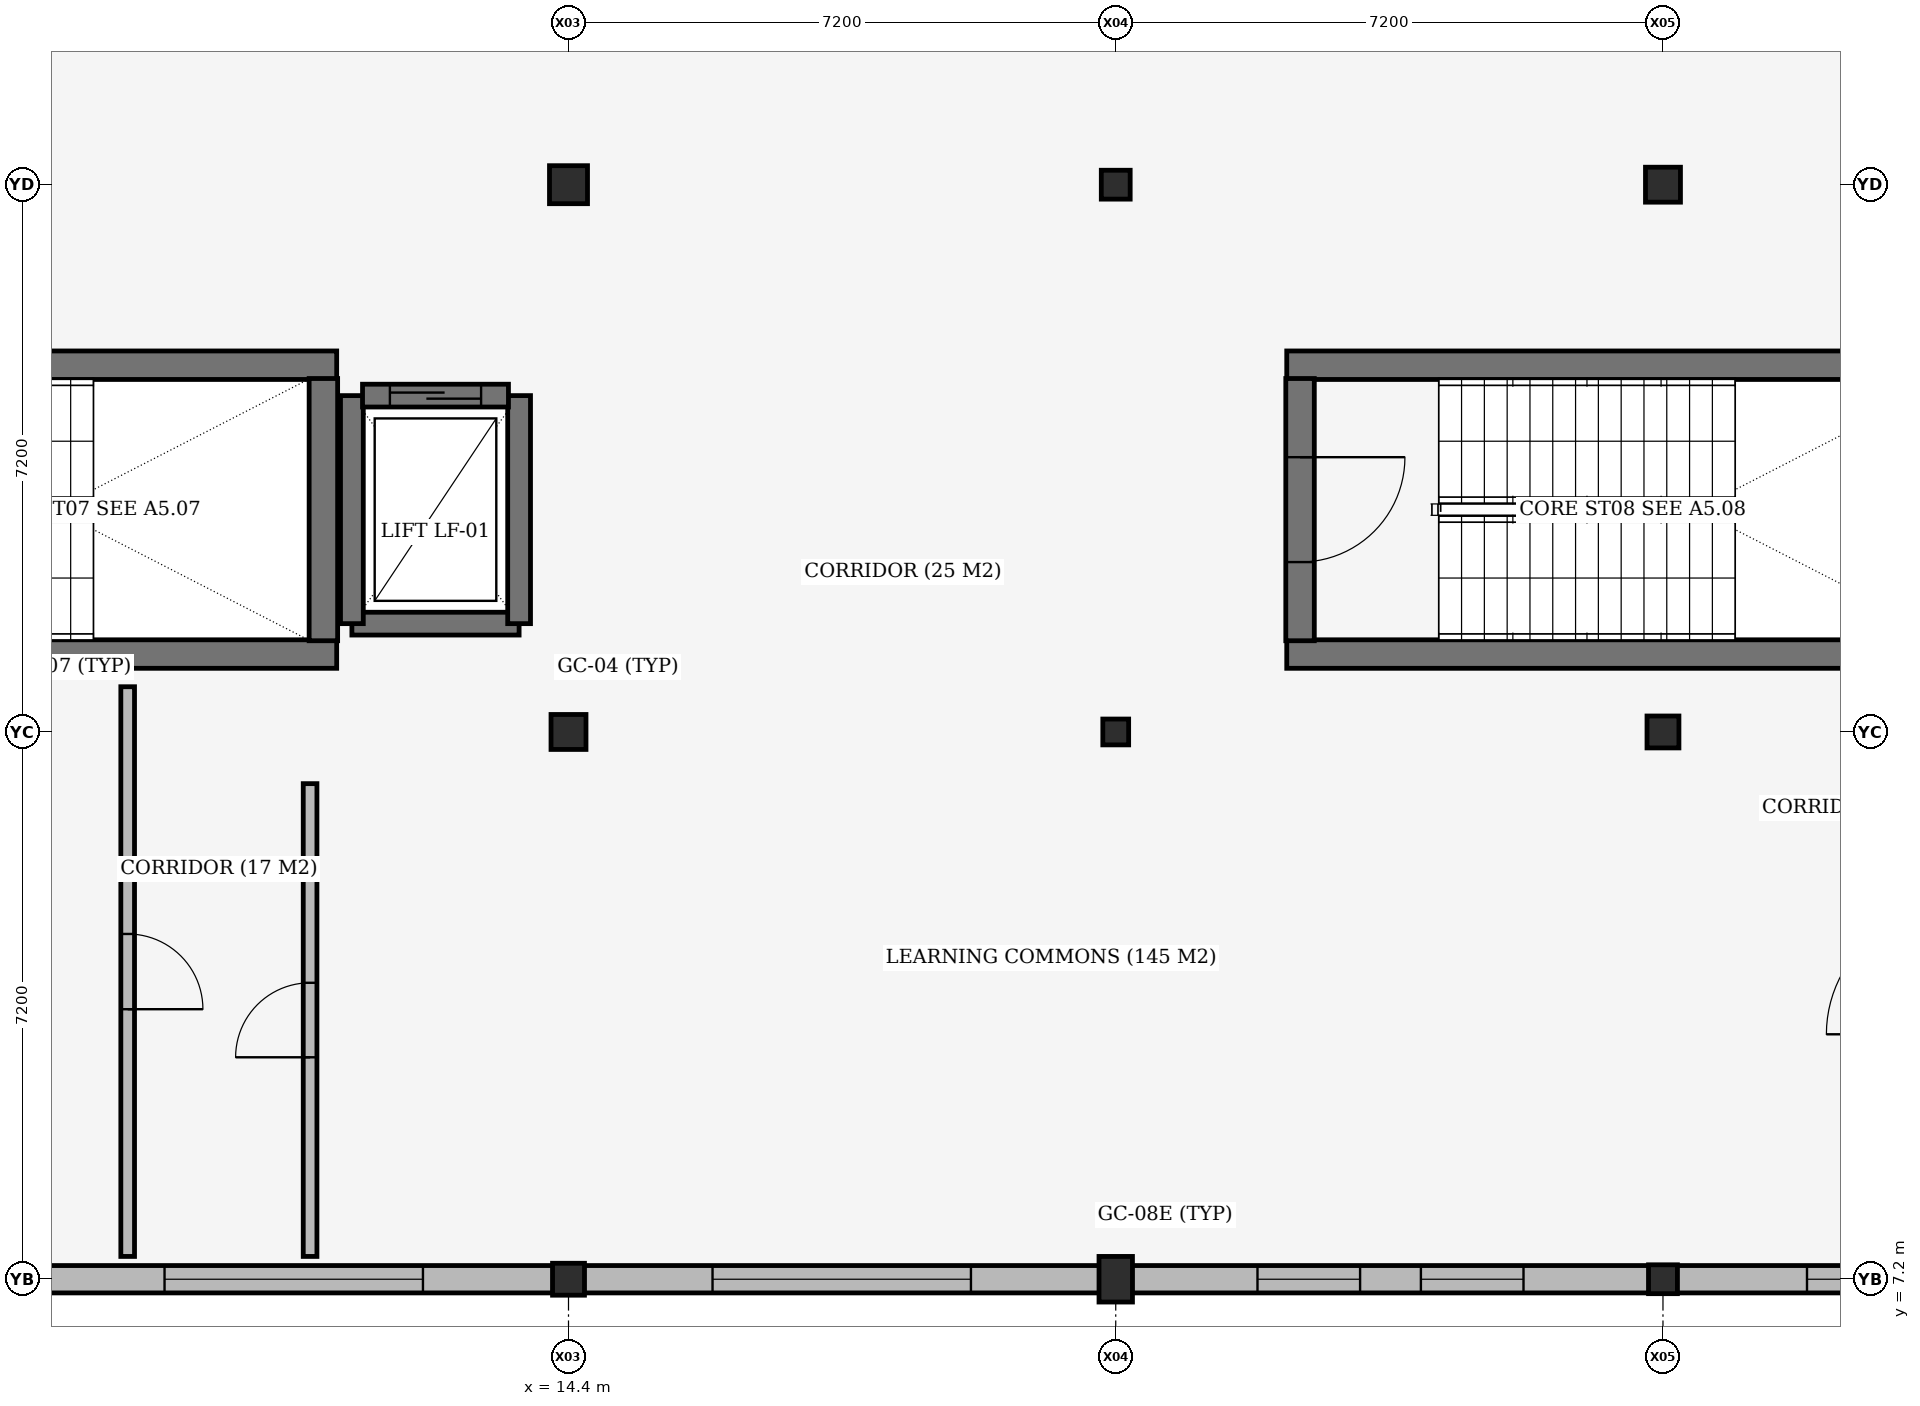
"""IFC4 building model, lengths in metres.
Left out: names, types, materials, properties, quantities, classifications, styles, units other than length and angle.
Written with IfcOpenShell. Run it as: python <this file> out.ifc"""

import sys

from ifc_helpers import new_model, si_unit, direction, frame, frame_2d, origin, origin_2d, place, context, subcontext, project, spatial, rectangle, extrude, element, fill, save


model = new_model("IFC4")
c1 = context("Model", 3, precision=1e-05, world=origin(), true_north=direction((0.0, 1.0)))
c2 = subcontext(c1, "Body", "Model", "MODEL_VIEW")
j1 = project(units=[si_unit("LENGTHUNIT", "METRE"), si_unit("PLANEANGLEUNIT", "RADIAN")], contexts=[c1])
p1 = place(None, origin())
s1 = spatial("IfcSite", under=j1, at=p1, CompositionType="ELEMENT")
p2 = place(p1, origin())
s2 = spatial("IfcBuilding", under=s1, at=p2, CompositionType="ELEMENT")
p3 = place(p2, frame((0.0, 0.0, 13.8)))
s3 = spatial("IfcBuildingStorey", under=s2, at=p3, CompositionType="ELEMENT", Elevation=13.8)
p4 = place(p3, frame((14.4, 7.2, 0.0), z_axis=(0.0, 0.0, 1.0), x_axis=(1.0, 0.0, 0.0)))
e1 = element("IfcColumn", 1, at=p4, inside=s3, PredefinedType="COLUMN", context=c2, shape_type="SweptSolid", body=[
    extrude(rectangle(XDim=0.42, YDim=0.42, at=origin_2d()), origin(), (0.0, 0.0, 1.0), 3.92),
])
p5 = place(p3, frame((14.4, 14.4, 0.0), z_axis=(0.0, 0.0, 1.0), x_axis=(1.0, 0.0, 0.0)))
e2 = element("IfcColumn", 2, at=p5, inside=s3, PredefinedType="COLUMN", context=c2, shape_type="SweptSolid", body=[
    extrude(rectangle(XDim=0.46, YDim=0.46, at=origin_2d()), origin(), (0.0, 0.0, 1.0), 3.92),
])
p6 = place(p3, frame((14.4, 21.6, 0.0), z_axis=(0.0, 0.0, 1.0), x_axis=(1.0, 0.0, 0.0)))
e3 = element("IfcColumn", 3, at=p6, inside=s3, PredefinedType="COLUMN", context=c2, shape_type="SweptSolid", body=[
    extrude(rectangle(XDim=0.5, YDim=0.5, at=origin_2d()), origin(), (0.0, 0.0, 1.0), 3.92),
])
p7 = place(p3, frame((21.6, 7.2, 0.0), z_axis=(0.0, 0.0, 1.0), x_axis=(1.0, 0.0, 0.0)))
e4 = element("IfcColumn", 4, at=p7, inside=s3, PredefinedType="COLUMN", context=c2, shape_type="SweptSolid", body=[
    extrude(rectangle(XDim=0.44, YDim=0.6, at=origin_2d()), origin(), (0.0, 0.0, 1.0), 3.92),
])
p8 = place(p3, frame((21.6, 14.4, 0.0), z_axis=(0.0, 0.0, 1.0), x_axis=(1.0, 0.0, 0.0)))
e5 = element("IfcColumn", 5, at=p8, inside=s3, PredefinedType="COLUMN", context=c2, shape_type="SweptSolid", body=[
    extrude(rectangle(XDim=0.34, YDim=0.34, at=origin_2d()), origin(), (0.0, 0.0, 1.0), 3.92),
])
for number, where, z_axis, x_axis in (
    (6, (21.6, 21.6, 0.0), (0.0, 0.0, 1.0), (1.0, 0.0, 0.0)),
    (7, (28.8, 7.2, 0.0), (0.0, 0.0, 1.0), (1.0, 0.0, 0.0)),
):
    element("IfcColumn", number, at=place(p3, frame(where, z_axis=z_axis, x_axis=x_axis)), inside=s3, PredefinedType="COLUMN", context=c2, shape_type="SweptSolid", body=[
        extrude(rectangle(XDim=0.38, YDim=0.38, at=origin_2d()), origin(), (0.0, 0.0, 1.0), 3.92),
    ])
p9 = place(p3, frame((28.8, 14.4, 0.0), z_axis=(0.0, 0.0, 1.0), x_axis=(1.0, 0.0, 0.0)))
e8 = element("IfcColumn", 8, at=p9, inside=s3, PredefinedType="COLUMN", context=c2, shape_type="SweptSolid", body=[
    extrude(rectangle(XDim=0.42, YDim=0.42, at=origin_2d()), origin(), (0.0, 0.0, 1.0), 3.92),
])
p10 = place(p3, frame((28.8, 21.6, 0.0), z_axis=(0.0, 0.0, 1.0), x_axis=(1.0, 0.0, 0.0)))
e9 = element("IfcColumn", 9, at=p10, inside=s3, PredefinedType="COLUMN", context=c2, shape_type="SweptSolid", body=[
    extrude(rectangle(XDim=0.46, YDim=0.46, at=origin_2d()), origin(), (0.0, 0.0, 1.0), 3.92),
])
for number, where, z_axis, x_axis in (
    (10, (2.25, 15.425, 0.0), (0.0, 0.0, 1.0), (1.0, 0.0, 0.0)),
    (11, (11.35, 19.225, 0.0), (0.0, 0.0, 1.0), (-1.0, 0.0, 0.0)),
):
    element("IfcWall", number, at=place(p3, frame(where, z_axis=z_axis, x_axis=x_axis)), inside=s3, PredefinedType="SHEAR", context=c2, shape_type="SweptSolid", body=[
        extrude(rectangle(XDim=9.1, YDim=0.375, at=frame_2d((4.55, 0.0))), origin(), (0.0, 0.0, 1.0), 3.92),
    ])
p11 = place(p3, frame((11.175, 15.6, 0.0), z_axis=(0.0, 0.0, 1.0), x_axis=(0.0, 1.0, 0.0)))
e12 = element("IfcWall", 12, at=p11, inside=s3, PredefinedType="SHEAR", context=c2, shape_type="SweptSolid", body=[
    extrude(rectangle(XDim=3.45, YDim=0.375, at=frame_2d((1.725, 0.0))), origin(), (0.0, 0.0, 1.0), 3.92),
])
for number, where, z_axis, x_axis in (
    (13, (23.85, 15.425, 0.0), (0.0, 0.0, 1.0), (1.0, 0.0, 0.0)),
    (14, (32.95, 19.225, 0.0), (0.0, 0.0, 1.0), (-1.0, 0.0, 0.0)),
):
    element("IfcWall", number, at=place(p3, frame(where, z_axis=z_axis, x_axis=x_axis)), inside=s3, PredefinedType="SHEAR", context=c2, shape_type="SweptSolid", body=[
        extrude(rectangle(XDim=9.1, YDim=0.375, at=frame_2d((4.55, 0.0))), origin(), (0.0, 0.0, 1.0), 3.92),
    ])
p12 = place(p3, frame((11.55, 15.825, 0.0), z_axis=(0.0, 0.0, 1.0), x_axis=(1.0, 0.0, 0.0)))
e15 = element("IfcWall", 15, at=p12, inside=s3, PredefinedType="SHEAR", context=c2, shape_type="SweptSolid", body=[
    extrude(rectangle(XDim=2.2, YDim=0.3, at=frame_2d((1.1, 0.0))), origin(), (0.0, 0.0, 1.0), 3.92),
])
for number, where, z_axis, x_axis in (
    (16, (11.55, 18.825, 0.0), (0.0, 0.0, 1.0), (0.0, -1.0, 0.0)),
    (17, (13.75, 15.825, 0.0), (0.0, 0.0, 1.0), (0.0, 1.0, 0.0)),
):
    element("IfcWall", number, at=place(p3, frame(where, z_axis=z_axis, x_axis=x_axis)), inside=s3, PredefinedType="SHEAR", context=c2, shape_type="SweptSolid", body=[
        extrude(rectangle(XDim=3.0, YDim=0.3, at=frame_2d((1.5, 0.0))), origin(), (0.0, 0.0, 1.0), 3.92),
    ])
p13 = place(p3, frame((14.198, 7.2, 0.0), z_axis=(0.0, 0.0, 1.0), x_axis=(-1.0, 0.0, 0.0)))
e18 = element("IfcWall", 18, at=p13, inside=s3, PredefinedType="STANDARD", context=c2, shape_type="SweptSolid", body=[
    extrude(rectangle(XDim=6.826, YDim=0.36, at=frame_2d((3.413, 0.0))), origin(), (0.0, 0.0, 1.0), 3.18),
])
p14 = place(p13, frame((1.713, 0.0, 0.9)))
e19 = element("IfcOpeningElement", 19, at=p14, cuts=e18, PredefinedType="OPENING", context=c2, shape_type="SweptSolid", body=[
    extrude(rectangle(XDim=3.4, YDim=1.5, at=frame_2d((1.7, 0.75))), frame((0.0, 0.19, 0.0), z_axis=(0.0, -1.0, 0.0), x_axis=(1.0, 0.0, 0.0)), (0.0, 0.0, 1.0), 0.38),
])
p15 = place(p3, frame((21.388, 7.2, 0.0), z_axis=(0.0, 0.0, 1.0), x_axis=(-1.0, 0.0, 0.0)))
e20 = element("IfcWall", 20, at=p15, inside=s3, PredefinedType="STANDARD", context=c2, shape_type="SweptSolid", body=[
    extrude(rectangle(XDim=6.786, YDim=0.36, at=frame_2d((3.393, 0.0))), origin(), (0.0, 0.0, 1.0), 3.24),
])
p16 = place(p15, frame((1.693, 0.0, 0.9)))
e21 = element("IfcOpeningElement", 21, at=p16, cuts=e20, PredefinedType="OPENING", context=c2, shape_type="SweptSolid", body=[
    extrude(rectangle(XDim=3.4, YDim=1.5, at=frame_2d((1.7, 0.75))), frame((0.0, 0.19, 0.0), z_axis=(0.0, -1.0, 0.0), x_axis=(1.0, 0.0, 0.0)), (0.0, 0.0, 1.0), 0.38),
])
p17 = place(p3, frame((28.618, 7.2, 0.0), z_axis=(0.0, 0.0, 1.0), x_axis=(-1.0, 0.0, 0.0)))
e22 = element("IfcWall", 22, at=p17, inside=s3, PredefinedType="STANDARD", context=c2, shape_type="SweptSolid", body=[
    extrude(rectangle(XDim=6.806, YDim=0.36, at=frame_2d((3.403, 0.0))), origin(), (0.0, 0.0, 1.0), 3.18),
])
p18 = place(p17, frame((1.653, 0.0, 0.95)))
e23 = element("IfcOpeningElement", 23, at=p18, cuts=e22, PredefinedType="OPENING", context=c2, shape_type="SweptSolid", body=[
    extrude(rectangle(XDim=1.35, YDim=2.0, at=frame_2d((0.675, 1.0))), frame((0.0, 0.19, 0.0), z_axis=(0.0, -1.0, 0.0), x_axis=(1.0, 0.0, 0.0)), (0.0, 0.0, 1.0), 0.38),
])
p19 = place(p17, frame((3.803, 0.0, 0.95)))
e24 = element("IfcOpeningElement", 24, at=p19, cuts=e22, PredefinedType="OPENING", context=c2, shape_type="SweptSolid", body=[
    extrude(rectangle(XDim=1.35, YDim=2.0, at=frame_2d((0.675, 1.0))), frame((0.0, 0.19, 0.0), z_axis=(0.0, -1.0, 0.0), x_axis=(1.0, 0.0, 0.0)), (0.0, 0.0, 1.0), 0.38),
])
p20 = place(p3, frame((35.808, 7.2, 0.0), z_axis=(0.0, 0.0, 1.0), x_axis=(-1.0, 0.0, 0.0)))
e25 = element("IfcWall", 25, at=p20, inside=s3, PredefinedType="STANDARD", context=c2, shape_type="SweptSolid", body=[
    extrude(rectangle(XDim=6.826, YDim=0.36, at=frame_2d((3.413, 0.0))), origin(), (0.0, 0.0, 1.0), 3.4),
])
p21 = place(p20, frame((1.713, 0.0, 0.9)))
e26 = element("IfcOpeningElement", 26, at=p21, cuts=e25, PredefinedType="OPENING", context=c2, shape_type="SweptSolid", body=[
    extrude(rectangle(XDim=3.4, YDim=1.5, at=frame_2d((1.7, 0.75))), frame((0.0, 0.19, 0.0), z_axis=(0.0, -1.0, 0.0), x_axis=(1.0, 0.0, 0.0)), (0.0, 0.0, 1.0), 0.38),
])
p22 = place(p3, frame((24.025, 19.05, 0.0), z_axis=(0.0, 0.0, 1.0), x_axis=(0.0, -1.0, 0.0)))
e27 = element("IfcWall", 27, at=p22, inside=s3, PredefinedType="SHEAR", context=c2, shape_type="SweptSolid", body=[
    extrude(rectangle(XDim=3.45, YDim=0.375, at=frame_2d((1.725, 0.0))), origin(), (0.0, 0.0, 1.0), 3.92),
])
p23 = place(p22, frame((1.035, 0.0, 0.0)))
e28 = element("IfcOpeningElement", 28, at=p23, cuts=e27, PredefinedType="OPENING", context=c2, shape_type="SweptSolid", body=[
    extrude(rectangle(XDim=1.38, YDim=2.2, at=frame_2d((0.69, 1.1))), frame((0.0, 0.198, 0.0), z_axis=(0.0, -1.0, 0.0), x_axis=(1.0, 0.0, 0.0)), (0.0, 0.0, 1.0), 0.395),
])
p24 = place(p3, frame((11.69, 18.825, 0.0), z_axis=(0.0, 0.0, 1.0), x_axis=(1.0, 0.0, 0.0)))
e29 = element("IfcWall", 29, at=p24, inside=s3, PredefinedType="SHEAR", context=c2, shape_type="SweptSolid", body=[
    extrude(rectangle(XDim=1.92, YDim=0.3, at=frame_2d((0.96, 0.0))), origin(), (0.0, 0.0, 1.0), 3.92),
])
p25 = place(p24, frame((0.36, 0.0, 0.0)))
e30 = element("IfcOpeningElement", 30, at=p25, cuts=e29, PredefinedType="OPENING", context=c2, shape_type="SweptSolid", body=[
    extrude(rectangle(XDim=1.2, YDim=2.1, at=frame_2d((0.6, 1.05))), frame((0.0, 0.16, 0.0), z_axis=(0.0, -1.0, 0.0), x_axis=(1.0, 0.0, 0.0)), (0.0, 0.0, 1.0), 0.32),
])
p26 = place(p3, frame((8.6, 7.5, 0.0), z_axis=(0.0, 0.0, 1.0), x_axis=(0.0, 1.0, 0.0)))
e31 = element("IfcWall", 31, at=p26, inside=s3, PredefinedType="PARTITIONING", context=c2, shape_type="SweptSolid", body=[
    extrude(rectangle(XDim=7.495, YDim=0.18, at=frame_2d((3.748, 0.0))), origin(), (0.0, 0.0, 1.0), 3.24),
])
p27 = place(p26, frame((3.252, 0.0, 0.0)))
e32 = element("IfcOpeningElement", 32, at=p27, cuts=e31, PredefinedType="OPENING", context=c2, shape_type="SweptSolid", body=[
    extrude(rectangle(XDim=0.99, YDim=2.18, at=frame_2d((0.495, 1.09))), frame((0.0, 0.1, 0.0), z_axis=(0.0, -1.0, 0.0), x_axis=(1.0, 0.0, 0.0)), (0.0, 0.0, 1.0), 0.2),
])
p28 = place(p3, frame((11.0, 7.5, 0.0), z_axis=(0.0, 0.0, 1.0), x_axis=(0.0, 1.0, 0.0)))
e33 = element("IfcWall", 33, at=p28, inside=s3, PredefinedType="PARTITIONING", context=c2, shape_type="SweptSolid", body=[
    extrude(rectangle(XDim=6.22, YDim=0.18, at=frame_2d((3.11, 0.0))), origin(), (0.0, 0.0, 1.0), 3.92),
])
p29 = place(p28, frame((2.62, 0.0, 0.0)))
e34 = element("IfcOpeningElement", 34, at=p29, cuts=e33, PredefinedType="OPENING", context=c2, shape_type="SweptSolid", body=[
    extrude(rectangle(XDim=0.98, YDim=2.18, at=frame_2d((0.49, 1.09))), frame((0.0, 0.1, 0.0), z_axis=(0.0, -1.0, 0.0), x_axis=(1.0, 0.0, 0.0)), (0.0, 0.0, 1.0), 0.2),
])
p30 = place(p14, origin())
e35 = element("IfcWindow", 35, at=p30, inside=s3, PartitioningType="DOUBLE_PANEL_VERTICAL", PredefinedType="WINDOW", context=c2, shape_type="SweptSolid", body=[
    extrude(rectangle(XDim=3.4, YDim=1.5, at=frame_2d((1.7, 0.75))), frame((0.0, 0.03, 0.0), z_axis=(0.0, -1.0, 0.0), x_axis=(1.0, 0.0, 0.0)), (0.0, 0.0, 1.0), 0.06),
])
fill(e19, e35)
p31 = place(p16, origin())
e36 = element("IfcWindow", 36, at=p31, inside=s3, PartitioningType="DOUBLE_PANEL_VERTICAL", PredefinedType="WINDOW", context=c2, shape_type="SweptSolid", body=[
    extrude(rectangle(XDim=3.4, YDim=1.5, at=frame_2d((1.7, 0.75))), frame((0.0, 0.03, 0.0), z_axis=(0.0, -1.0, 0.0), x_axis=(1.0, 0.0, 0.0)), (0.0, 0.0, 1.0), 0.06),
])
fill(e21, e36)
p32 = place(p18, origin())
e37 = element("IfcWindow", 37, at=p32, inside=s3, PartitioningType="DOUBLE_PANEL_VERTICAL", PredefinedType="WINDOW", context=c2, shape_type="SweptSolid", body=[
    extrude(rectangle(XDim=1.35, YDim=2.0, at=frame_2d((0.675, 1.0))), frame((0.0, 0.03, 0.0), z_axis=(0.0, -1.0, 0.0), x_axis=(1.0, 0.0, 0.0)), (0.0, 0.0, 1.0), 0.06),
])
fill(e23, e37)
p33 = place(p19, origin())
e38 = element("IfcWindow", 38, at=p33, inside=s3, PartitioningType="DOUBLE_PANEL_VERTICAL", PredefinedType="WINDOW", context=c2, shape_type="SweptSolid", body=[
    extrude(rectangle(XDim=1.35, YDim=2.0, at=frame_2d((0.675, 1.0))), frame((0.0, 0.03, 0.0), z_axis=(0.0, -1.0, 0.0), x_axis=(1.0, 0.0, 0.0)), (0.0, 0.0, 1.0), 0.06),
])
fill(e24, e38)
p34 = place(p21, origin())
e39 = element("IfcWindow", 39, at=p34, inside=s3, PartitioningType="DOUBLE_PANEL_VERTICAL", PredefinedType="WINDOW", context=c2, shape_type="SweptSolid", body=[
    extrude(rectangle(XDim=3.4, YDim=1.5, at=frame_2d((1.7, 0.75))), frame((0.0, 0.03, 0.0), z_axis=(0.0, -1.0, 0.0), x_axis=(1.0, 0.0, 0.0)), (0.0, 0.0, 1.0), 0.06),
])
fill(e26, e39)
p35 = place(p23, origin())
e40 = element("IfcDoor", 40, at=p35, inside=s3, OperationType="DOUBLE_DOOR_SINGLE_SWING", PredefinedType="DOOR", context=c2, shape_type="SweptSolid", body=[
    extrude(rectangle(XDim=1.38, YDim=2.2, at=frame_2d((0.69, 1.1))), frame((0.0, 0.025, 0.0), z_axis=(0.0, -1.0, 0.0), x_axis=(1.0, 0.0, 0.0)), (0.0, 0.0, 1.0), 0.05),
])
fill(e28, e40)
p36 = place(p25, origin())
e41 = element("IfcDoor", 41, at=p36, inside=s3, OperationType="SLIDING_TO_LEFT", PredefinedType="DOOR", context=c2, shape_type="SweptSolid", body=[
    extrude(rectangle(XDim=1.2, YDim=2.1, at=frame_2d((0.6, 1.05))), frame((0.0, 0.025, 0.0), z_axis=(0.0, -1.0, 0.0), x_axis=(1.0, 0.0, 0.0)), (0.0, 0.0, 1.0), 0.05),
])
fill(e30, e41)
p37 = place(p27, origin())
e42 = element("IfcDoor", 42, at=p37, inside=s3, OperationType="SINGLE_SWING_RIGHT", PredefinedType="DOOR", context=c2, shape_type="SweptSolid", body=[
    extrude(rectangle(XDim=0.99, YDim=2.18, at=frame_2d((0.495, 1.09))), frame((0.0, 0.025, 0.0), z_axis=(0.0, -1.0, 0.0), x_axis=(1.0, 0.0, 0.0)), (0.0, 0.0, 1.0), 0.05),
])
fill(e32, e42)
p38 = place(p29, origin())
e43 = element("IfcDoor", 43, at=p38, inside=s3, OperationType="SINGLE_SWING_LEFT", PredefinedType="DOOR", context=c2, shape_type="SweptSolid", body=[
    extrude(rectangle(XDim=0.98, YDim=2.18, at=frame_2d((0.49, 1.09))), frame((0.0, 0.025, 0.0), z_axis=(0.0, -1.0, 0.0), x_axis=(1.0, 0.0, 0.0)), (0.0, 0.0, 1.0), 0.05),
])
fill(e34, e43)
save(model, sys.argv[1])
